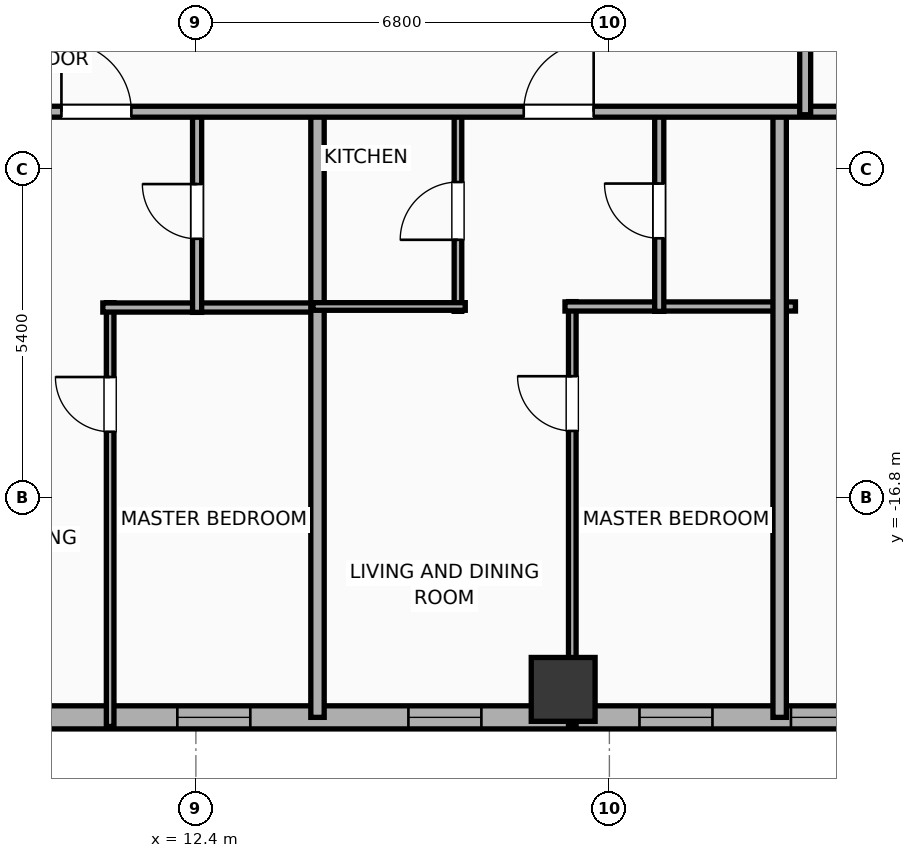
"""IFC4 building model, lengths in metres.
Left out: names, types, materials, properties, quantities, classifications, styles, units other than length and angle.
Written with IfcOpenShell. Run it as: python <this file> out.ifc"""

import sys

from ifc_helpers import new_model, si_unit, direction, frame, frame_2d, origin, origin_2d, place, context, subcontext, project, spatial, rectangle, hollow_rectangle, extrude, element, fill, save


model = new_model("IFC4")
c1 = context("Model", 3, precision=1e-05, world=origin(), true_north=direction((0.0, 1.0)))
c2 = subcontext(c1, "Body", "Model", "MODEL_VIEW")
j1 = project(units=[si_unit("LENGTHUNIT", "METRE"), si_unit("PLANEANGLEUNIT", "RADIAN")], contexts=[c1])
p1 = place(None, origin())
s1 = spatial("IfcSite", under=j1, at=p1, CompositionType="ELEMENT")
p2 = place(p1, origin())
s2 = spatial("IfcBuilding", under=s1, at=p2, CompositionType="ELEMENT")
p3 = place(p2, frame((0.0, 0.0, 93.6)))
s3 = spatial("IfcBuildingStorey", under=s2, at=p3, CompositionType="ELEMENT", Elevation=93.6)
p4 = place(p3, frame((18.44, -19.95, 0.0), z_axis=(0.0, 0.0, 1.0), x_axis=(1.0, 0.0, 0.0)))
e1 = element("IfcColumn", 1, at=p4, inside=s3, PredefinedType="COLUMN", context=c2, shape_type="SweptSolid", body=[
    extrude(hollow_rectangle(XDim=1.05, YDim=1.05, WallThickness=0.036, at=origin_2d()), origin(), (0.0, 0.0, 1.0), 3.9),
])
p5 = place(p3, frame((29.381, -20.41, 0.0), z_axis=(0.0, 0.0, 1.0), x_axis=(-1.0, 0.0, 0.0)))
e2 = element("IfcWall", 2, at=p5, inside=s3, PredefinedType="ELEMENTEDWALL", context=c2, shape_type="SweptSolid", body=[
    extrude(rectangle(XDim=54.763, YDim=0.38, at=frame_2d((27.381, 0.0))), origin(), (0.0, 0.0, 1.0), 3.65),
])
p6 = place(p5, frame((4.795, 0.0, 0.75)))
e3 = element("IfcOpeningElement", 3, at=p6, cuts=e2, PredefinedType="OPENING", context=c2, shape_type="SweptSolid", body=[
    extrude(rectangle(XDim=2.4, YDim=2.1, at=frame_2d((1.2, 1.05))), frame((0.0, 0.2, 0.0), z_axis=(0.0, -1.0, 0.0), x_axis=(1.0, 0.0, 0.0)), (0.0, 0.0, 1.0), 0.4),
])
p7 = place(p5, frame((33.877, 0.0, 0.75)))
e4 = element("IfcOpeningElement", 4, at=p7, cuts=e2, PredefinedType="OPENING", context=c2, shape_type="SweptSolid", body=[
    extrude(rectangle(XDim=2.4, YDim=2.1, at=frame_2d((1.2, 1.05))), frame((0.0, 0.2, 0.0), z_axis=(0.0, -1.0, 0.0), x_axis=(1.0, 0.0, 0.0)), (0.0, 0.0, 1.0), 0.4),
])
p8 = place(p5, frame((45.867, 0.0, 0.75)))
e5 = element("IfcOpeningElement", 5, at=p8, cuts=e2, PredefinedType="OPENING", context=c2, shape_type="SweptSolid", body=[
    extrude(rectangle(XDim=2.4, YDim=2.1, at=frame_2d((1.2, 1.05))), frame((0.0, 0.2, 0.0), z_axis=(0.0, -1.0, 0.0), x_axis=(1.0, 0.0, 0.0)), (0.0, 0.0, 1.0), 0.4),
])
p9 = place(p5, frame((53.122, 0.0, 0.75)))
e6 = element("IfcOpeningElement", 6, at=p9, cuts=e2, PredefinedType="OPENING", context=c2, shape_type="SweptSolid", body=[
    extrude(rectangle(XDim=0.85, YDim=2.05, at=frame_2d((0.425, 1.025))), frame((0.0, 0.2, 0.0), z_axis=(0.0, -1.0, 0.0), x_axis=(1.0, 0.0, 0.0)), (0.0, 0.0, 1.0), 0.4),
])
p10 = place(p5, frame((50.286, 0.0, 0.75)))
e7 = element("IfcOpeningElement", 7, at=p10, cuts=e2, PredefinedType="OPENING", context=c2, shape_type="SweptSolid", body=[
    extrude(rectangle(XDim=1.2, YDim=2.05, at=frame_2d((0.6, 1.025))), frame((0.0, 0.2, 0.0), z_axis=(0.0, -1.0, 0.0), x_axis=(1.0, 0.0, 0.0)), (0.0, 0.0, 1.0), 0.4),
])
p11 = place(p5, frame((41.846, 0.0, 0.75)))
e8 = element("IfcOpeningElement", 8, at=p11, cuts=e2, PredefinedType="OPENING", context=c2, shape_type="SweptSolid", body=[
    extrude(rectangle(XDim=1.2, YDim=2.05, at=frame_2d((0.6, 1.025))), frame((0.0, 0.2, 0.0), z_axis=(0.0, -1.0, 0.0), x_axis=(1.0, 0.0, 0.0)), (0.0, 0.0, 1.0), 0.4),
])
p12 = place(p5, frame((38.886, 0.0, 0.75)))
e9 = element("IfcOpeningElement", 9, at=p12, cuts=e2, PredefinedType="OPENING", context=c2, shape_type="SweptSolid", body=[
    extrude(rectangle(XDim=1.2, YDim=2.05, at=frame_2d((0.6, 1.025))), frame((0.0, 0.2, 0.0), z_axis=(0.0, -1.0, 0.0), x_axis=(1.0, 0.0, 0.0)), (0.0, 0.0, 1.0), 0.4),
])
p13 = place(p5, frame((30.926, 0.0, 0.75)))
e10 = element("IfcOpeningElement", 10, at=p13, cuts=e2, PredefinedType="OPENING", context=c2, shape_type="SweptSolid", body=[
    extrude(rectangle(XDim=1.2, YDim=2.05, at=frame_2d((0.6, 1.025))), frame((0.0, 0.2, 0.0), z_axis=(0.0, -1.0, 0.0), x_axis=(1.0, 0.0, 0.0)), (0.0, 0.0, 1.0), 0.4),
])
p14 = place(p5, frame((27.486, 0.0, 0.75)))
e11 = element("IfcOpeningElement", 11, at=p14, cuts=e2, PredefinedType="OPENING", context=c2, shape_type="SweptSolid", body=[
    extrude(rectangle(XDim=1.2, YDim=2.05, at=frame_2d((0.6, 1.025))), frame((0.0, 0.2, 0.0), z_axis=(0.0, -1.0, 0.0), x_axis=(1.0, 0.0, 0.0)), (0.0, 0.0, 1.0), 0.4),
])
p15 = place(p5, frame((23.686, 0.0, 0.75)))
e12 = element("IfcOpeningElement", 12, at=p15, cuts=e2, PredefinedType="OPENING", context=c2, shape_type="SweptSolid", body=[
    extrude(rectangle(XDim=1.2, YDim=2.05, at=frame_2d((0.6, 1.025))), frame((0.0, 0.2, 0.0), z_axis=(0.0, -1.0, 0.0), x_axis=(1.0, 0.0, 0.0)), (0.0, 0.0, 1.0), 0.4),
])
p16 = place(p5, frame((19.886, 0.0, 0.75)))
e13 = element("IfcOpeningElement", 13, at=p16, cuts=e2, PredefinedType="OPENING", context=c2, shape_type="SweptSolid", body=[
    extrude(rectangle(XDim=1.2, YDim=2.05, at=frame_2d((0.6, 1.025))), frame((0.0, 0.2, 0.0), z_axis=(0.0, -1.0, 0.0), x_axis=(1.0, 0.0, 0.0)), (0.0, 0.0, 1.0), 0.4),
])
p17 = place(p5, frame((16.086, 0.0, 0.75)))
e14 = element("IfcOpeningElement", 14, at=p17, cuts=e2, PredefinedType="OPENING", context=c2, shape_type="SweptSolid", body=[
    extrude(rectangle(XDim=1.2, YDim=2.05, at=frame_2d((0.6, 1.025))), frame((0.0, 0.2, 0.0), z_axis=(0.0, -1.0, 0.0), x_axis=(1.0, 0.0, 0.0)), (0.0, 0.0, 1.0), 0.4),
])
p18 = place(p5, frame((12.286, 0.0, 0.75)))
e15 = element("IfcOpeningElement", 15, at=p18, cuts=e2, PredefinedType="OPENING", context=c2, shape_type="SweptSolid", body=[
    extrude(rectangle(XDim=1.2, YDim=2.05, at=frame_2d((0.6, 1.025))), frame((0.0, 0.2, 0.0), z_axis=(0.0, -1.0, 0.0), x_axis=(1.0, 0.0, 0.0)), (0.0, 0.0, 1.0), 0.4),
])
p19 = place(p5, frame((8.486, 0.0, 0.75)))
e16 = element("IfcOpeningElement", 16, at=p19, cuts=e2, PredefinedType="OPENING", context=c2, shape_type="SweptSolid", body=[
    extrude(rectangle(XDim=1.2, YDim=2.05, at=frame_2d((0.6, 1.025))), frame((0.0, 0.2, 0.0), z_axis=(0.0, -1.0, 0.0), x_axis=(1.0, 0.0, 0.0)), (0.0, 0.0, 1.0), 0.4),
])
p20 = place(p5, frame((2.277, 0.0, 0.75)))
e17 = element("IfcOpeningElement", 17, at=p20, cuts=e2, PredefinedType="OPENING", context=c2, shape_type="SweptSolid", body=[
    extrude(rectangle(XDim=1.2, YDim=2.05, at=frame_2d((0.6, 1.025))), frame((0.0, 0.2, 0.0), z_axis=(0.0, -1.0, 0.0), x_axis=(1.0, 0.0, 0.0)), (0.0, 0.0, 1.0), 0.4),
])
p21 = place(p5, frame((1.071, 0.0, 0.75)))
e18 = element("IfcOpeningElement", 18, at=p21, cuts=e2, PredefinedType="OPENING", context=c2, shape_type="SweptSolid", body=[
    extrude(rectangle(XDim=0.52, YDim=2.05, at=frame_2d((0.26, 1.025))), frame((0.0, 0.2, 0.0), z_axis=(0.0, -1.0, 0.0), x_axis=(1.0, 0.0, 0.0)), (0.0, 0.0, 1.0), 0.4),
])
p22 = place(p3, frame((10.99, -20.56, 0.0), z_axis=(0.0, 0.0, 1.0), x_axis=(0.0, 1.0, 0.0)))
e19 = element("IfcWall", 19, at=p22, inside=s3, PredefinedType="PARTITIONING", context=c2, shape_type="SweptSolid", body=[
    extrude(rectangle(XDim=6.97, YDim=0.125, at=frame_2d((3.485, 0.0))), origin(), (0.0, 0.0, 1.0), 3.65),
])
p23 = place(p22, frame((4.847, 0.0, 0.0)))
e20 = element("IfcOpeningElement", 20, at=p23, cuts=e19, PredefinedType="OPENING", context=c2, shape_type="SweptSolid", body=[
    extrude(rectangle(XDim=0.9, YDim=2.05, at=frame_2d((0.45, 1.025))), frame((0.0, 0.073, 0.0), z_axis=(0.0, -1.0, 0.0), x_axis=(1.0, 0.0, 0.0)), (0.0, 0.0, 1.0), 0.145),
])
p24 = place(p3, frame((10.87, -13.67, 0.0), z_axis=(0.0, 0.0, 1.0), x_axis=(1.0, 0.0, 0.0)))
e21 = element("IfcWall", 21, at=p24, inside=s3, PredefinedType="PLUMBINGWALL", context=c2, shape_type="SweptSolid", body=[
    extrude(rectangle(XDim=3.605, YDim=0.15, at=frame_2d((1.802, 0.0))), origin(), (0.0, 0.0, 1.0), 3.65),
])
p25 = place(p3, frame((12.42, -13.75, 0.0), z_axis=(0.0, 0.0, 1.0), x_axis=(0.0, 1.0, 0.0)))
e22 = element("IfcWall", 22, at=p25, inside=s3, PredefinedType="PLUMBINGWALL", context=c2, shape_type="SweptSolid", body=[
    extrude(rectangle(XDim=3.32, YDim=0.15, at=frame_2d((1.66, 0.0))), origin(), (0.0, 0.0, 1.0), 3.65),
])
p26 = place(p25, frame((1.21, 0.0, 0.0)))
e23 = element("IfcOpeningElement", 23, at=p26, cuts=e22, PredefinedType="OPENING", context=c2, shape_type="SweptSolid", body=[
    extrude(rectangle(XDim=0.9, YDim=2.05, at=frame_2d((0.45, 1.025))), frame((0.0, 0.085, 0.0), z_axis=(0.0, -1.0, 0.0), x_axis=(1.0, 0.0, 0.0)), (0.0, 0.0, 1.0), 0.17),
])
p27 = place(p3, frame((14.4, -20.41, 0.0), z_axis=(0.0, 0.0, 1.0), x_axis=(0.0, 1.0, 0.0)))
e24 = element("IfcWall", 24, at=p27, inside=s3, PredefinedType="PARTITIONING", context=c2, shape_type="SweptSolid", body=[
    extrude(rectangle(XDim=10.04, YDim=0.22, at=frame_2d((5.02, 0.0))), origin(), (0.0, 0.0, 1.0), 3.65),
])
p28 = place(p3, frame((18.59, -20.56, 0.0), z_axis=(0.0, 0.0, 1.0), x_axis=(0.0, 1.0, 0.0)))
e25 = element("IfcWall", 25, at=p28, inside=s3, PredefinedType="PARTITIONING", context=c2, shape_type="SweptSolid", body=[
    extrude(rectangle(XDim=6.987, YDim=0.125, at=frame_2d((3.494, 0.0))), origin(), (0.0, 0.0, 1.0), 3.04),
])
p29 = place(p28, frame((4.86, 0.0, 0.0)))
e26 = element("IfcOpeningElement", 26, at=p29, cuts=e25, PredefinedType="OPENING", context=c2, shape_type="SweptSolid", body=[
    extrude(rectangle(XDim=0.9, YDim=2.05, at=frame_2d((0.45, 1.025))), frame((0.0, 0.073, 0.0), z_axis=(0.0, -1.0, 0.0), x_axis=(1.0, 0.0, 0.0)), (0.0, 0.0, 1.0), 0.145),
])
p30 = place(p3, frame((18.47, -13.653, 0.0), z_axis=(0.0, 0.0, 1.0), x_axis=(1.0, 0.0, 0.0)))
e27 = element("IfcWall", 27, at=p30, inside=s3, PredefinedType="PLUMBINGWALL", context=c2, shape_type="SweptSolid", body=[
    extrude(rectangle(XDim=3.79, YDim=0.15, at=frame_2d((1.895, 0.0))), origin(), (0.0, 0.0, 1.0), 3.65),
])
p31 = place(p3, frame((16.71, -13.733, 0.0), z_axis=(0.0, 0.0, 1.0), x_axis=(0.0, 1.0, 0.0)))
e28 = element("IfcWall", 28, at=p31, inside=s3, PredefinedType="PARTITIONING", context=c2, shape_type="SweptSolid", body=[
    extrude(rectangle(XDim=3.303, YDim=0.125, at=frame_2d((1.651, 0.0))), origin(), (0.0, 0.0, 1.0), 3.65),
])
p32 = place(p31, frame((1.177, 0.0, 0.0)))
e29 = element("IfcOpeningElement", 29, at=p32, cuts=e28, PredefinedType="OPENING", context=c2, shape_type="SweptSolid", body=[
    extrude(rectangle(XDim=0.95, YDim=2.05, at=frame_2d((0.475, 1.025))), frame((0.0, 0.073, 0.0), z_axis=(0.0, -1.0, 0.0), x_axis=(1.0, 0.0, 0.0)), (0.0, 0.0, 1.0), 0.145),
])
p33 = place(p3, frame((14.325, -13.653, 0.0), z_axis=(0.0, 0.0, 1.0), x_axis=(1.0, 0.0, 0.0)))
e30 = element("IfcWall", 30, at=p33, inside=s3, PredefinedType="PARTITIONING", context=c2, shape_type="SweptSolid", body=[
    extrude(rectangle(XDim=2.505, YDim=0.125, at=frame_2d((1.252, 0.0))), origin(), (0.0, 0.0, 1.0), 3.65),
])
p34 = place(p3, frame((20.02, -13.733, 0.0), z_axis=(0.0, 0.0, 1.0), x_axis=(0.0, 1.0, 0.0)))
e31 = element("IfcWall", 31, at=p34, inside=s3, PredefinedType="PLUMBINGWALL", context=c2, shape_type="SweptSolid", body=[
    extrude(rectangle(XDim=3.303, YDim=0.15, at=frame_2d((1.651, 0.0))), origin(), (0.0, 0.0, 1.0), 3.65),
])
p35 = place(p34, frame((1.201, 0.0, 0.0)))
e32 = element("IfcOpeningElement", 32, at=p35, cuts=e31, PredefinedType="OPENING", context=c2, shape_type="SweptSolid", body=[
    extrude(rectangle(XDim=0.9, YDim=2.05, at=frame_2d((0.45, 1.025))), frame((0.0, 0.085, 0.0), z_axis=(0.0, -1.0, 0.0), x_axis=(1.0, 0.0, 0.0)), (0.0, 0.0, 1.0), 0.17),
])
p36 = place(p3, frame((22.0, -20.41, 0.0), z_axis=(0.0, 0.0, 1.0), x_axis=(0.0, 1.0, 0.0)))
e33 = element("IfcWall", 33, at=p36, inside=s3, PredefinedType="PARTITIONING", context=c2, shape_type="SweptSolid", body=[
    extrude(rectangle(XDim=10.04, YDim=0.22, at=frame_2d((5.02, 0.0))), origin(), (0.0, 0.0, 1.0), 3.65),
])
p37 = place(p3, frame((-29.21, -10.45, 0.0), z_axis=(0.0, 0.0, 1.0), x_axis=(1.0, 0.0, 0.0)))
e34 = element("IfcWall", 34, at=p37, inside=s3, PredefinedType="PARTITIONING", context=c2, shape_type="SweptSolid", body=[
    extrude(rectangle(XDim=62.42, YDim=0.18, at=frame_2d((31.21, 0.0))), origin(), (0.0, 0.0, 1.0), 3.65),
])
p38 = place(p37, frame((2.502, 0.0, 0.0)))
e35 = element("IfcOpeningElement", 35, at=p38, cuts=e34, PredefinedType="OPENING", context=c2, shape_type="SweptSolid", body=[
    extrude(rectangle(XDim=0.9, YDim=2.05, at=frame_2d((0.45, 1.025))), frame((0.0, 0.1, 0.0), z_axis=(0.0, -1.0, 0.0), x_axis=(1.0, 0.0, 0.0)), (0.0, 0.0, 1.0), 0.2),
])
p39 = place(p37, frame((9.0, 0.0, 0.0)))
e36 = element("IfcOpeningElement", 36, at=p39, cuts=e34, PredefinedType="OPENING", context=c2, shape_type="SweptSolid", body=[
    extrude(rectangle(XDim=1.15, YDim=2.05, at=frame_2d((0.575, 1.025))), frame((0.0, 0.1, 0.0), z_axis=(0.0, -1.0, 0.0), x_axis=(1.0, 0.0, 0.0)), (0.0, 0.0, 1.0), 0.2),
])
p40 = place(p37, frame((16.603, 0.0, 0.0)))
e37 = element("IfcOpeningElement", 37, at=p40, cuts=e34, PredefinedType="OPENING", context=c2, shape_type="SweptSolid", body=[
    extrude(rectangle(XDim=1.15, YDim=2.05, at=frame_2d((0.575, 1.025))), frame((0.0, 0.1, 0.0), z_axis=(0.0, -1.0, 0.0), x_axis=(1.0, 0.0, 0.0)), (0.0, 0.0, 1.0), 0.2),
])
p41 = place(p37, frame((24.199, 0.0, 0.0)))
e38 = element("IfcOpeningElement", 38, at=p41, cuts=e34, PredefinedType="OPENING", context=c2, shape_type="SweptSolid", body=[
    extrude(rectangle(XDim=1.15, YDim=2.05, at=frame_2d((0.575, 1.025))), frame((0.0, 0.1, 0.0), z_axis=(0.0, -1.0, 0.0), x_axis=(1.0, 0.0, 0.0)), (0.0, 0.0, 1.0), 0.2),
])
p42 = place(p37, frame((31.802, 0.0, 0.0)))
e39 = element("IfcOpeningElement", 39, at=p42, cuts=e34, PredefinedType="OPENING", context=c2, shape_type="SweptSolid", body=[
    extrude(rectangle(XDim=1.15, YDim=2.05, at=frame_2d((0.575, 1.025))), frame((0.0, 0.1, 0.0), z_axis=(0.0, -1.0, 0.0), x_axis=(1.0, 0.0, 0.0)), (0.0, 0.0, 1.0), 0.2),
])
p43 = place(p37, frame((39.399, 0.0, 0.0)))
e40 = element("IfcOpeningElement", 40, at=p43, cuts=e34, PredefinedType="OPENING", context=c2, shape_type="SweptSolid", body=[
    extrude(rectangle(XDim=1.15, YDim=2.05, at=frame_2d((0.575, 1.025))), frame((0.0, 0.1, 0.0), z_axis=(0.0, -1.0, 0.0), x_axis=(1.0, 0.0, 0.0)), (0.0, 0.0, 1.0), 0.2),
])
p44 = place(p37, frame((47.001, 0.0, 0.0)))
e41 = element("IfcOpeningElement", 41, at=p44, cuts=e34, PredefinedType="OPENING", context=c2, shape_type="SweptSolid", body=[
    extrude(rectangle(XDim=1.15, YDim=2.05, at=frame_2d((0.575, 1.025))), frame((0.0, 0.1, 0.0), z_axis=(0.0, -1.0, 0.0), x_axis=(1.0, 0.0, 0.0)), (0.0, 0.0, 1.0), 0.2),
])
p45 = place(p37, frame((52.363, 0.0, 0.0)))
e42 = element("IfcOpeningElement", 42, at=p45, cuts=e34, PredefinedType="OPENING", context=c2, shape_type="SweptSolid", body=[
    extrude(rectangle(XDim=1.15, YDim=2.05, at=frame_2d((0.575, 1.025))), frame((0.0, 0.1, 0.0), z_axis=(0.0, -1.0, 0.0), x_axis=(1.0, 0.0, 0.0)), (0.0, 0.0, 1.0), 0.2),
])
p46 = place(p37, frame((59.386, 0.0, 0.0)))
e43 = element("IfcOpeningElement", 43, at=p46, cuts=e34, PredefinedType="OPENING", context=c2, shape_type="SweptSolid", body=[
    extrude(rectangle(XDim=0.9, YDim=2.05, at=frame_2d((0.45, 1.025))), frame((0.0, 0.1, 0.0), z_axis=(0.0, -1.0, 0.0), x_axis=(1.0, 0.0, 0.0)), (0.0, 0.0, 1.0), 0.2),
])
p47 = place(p3, frame((22.42, -10.5, 0.0), z_axis=(0.0, 0.0, 1.0), x_axis=(0.0, 1.0, 0.0)))
e44 = element("IfcWall", 44, at=p47, inside=s3, PredefinedType="PARTITIONING", context=c2, shape_type="SweptSolid", body=[
    extrude(rectangle(XDim=21.0, YDim=0.18, at=frame_2d((10.5, 0.0))), origin(), (0.0, 0.0, 1.0), 3.65),
])
p48 = place(p47, frame((18.205, 0.0, 0.0)))
e45 = element("IfcOpeningElement", 45, at=p48, cuts=e44, PredefinedType="OPENING", context=c2, shape_type="SweptSolid", body=[
    extrude(rectangle(XDim=0.95, YDim=2.05, at=frame_2d((0.475, 1.025))), frame((0.0, 0.1, 0.0), z_axis=(0.0, -1.0, 0.0), x_axis=(1.0, 0.0, 0.0)), (0.0, 0.0, 1.0), 0.2),
])
p49 = place(p6, origin())
e46 = element("IfcWindow", 46, at=p49, inside=s3, PartitioningType="SINGLE_PANEL", PredefinedType="WINDOW", context=c2, shape_type="SweptSolid", body=[
    extrude(rectangle(XDim=2.4, YDim=2.1, at=frame_2d((1.2, 1.05))), frame((0.0, 0.03, 0.0), z_axis=(0.0, -1.0, 0.0), x_axis=(1.0, 0.0, 0.0)), (0.0, 0.0, 1.0), 0.06),
])
fill(e3, e46)
p50 = place(p17, origin())
e47 = element("IfcWindow", 47, at=p50, inside=s3, PartitioningType="SINGLE_PANEL", PredefinedType="WINDOW", context=c2, shape_type="SweptSolid", body=[
    extrude(rectangle(XDim=1.2, YDim=2.05, at=frame_2d((0.6, 1.025))), frame((0.0, 0.03, 0.0), z_axis=(0.0, -1.0, 0.0), x_axis=(1.0, 0.0, 0.0)), (0.0, 0.0, 1.0), 0.06),
])
fill(e14, e47)
p51 = place(p18, origin())
e48 = element("IfcWindow", 48, at=p51, inside=s3, PartitioningType="SINGLE_PANEL", PredefinedType="WINDOW", context=c2, shape_type="SweptSolid", body=[
    extrude(rectangle(XDim=1.2, YDim=2.05, at=frame_2d((0.6, 1.025))), frame((0.0, 0.03, 0.0), z_axis=(0.0, -1.0, 0.0), x_axis=(1.0, 0.0, 0.0)), (0.0, 0.0, 1.0), 0.06),
])
fill(e15, e48)
p52 = place(p19, origin())
e49 = element("IfcWindow", 49, at=p52, inside=s3, PartitioningType="SINGLE_PANEL", PredefinedType="WINDOW", context=c2, shape_type="SweptSolid", body=[
    extrude(rectangle(XDim=1.2, YDim=2.05, at=frame_2d((0.6, 1.025))), frame((0.0, 0.03, 0.0), z_axis=(0.0, -1.0, 0.0), x_axis=(1.0, 0.0, 0.0)), (0.0, 0.0, 1.0), 0.06),
])
fill(e16, e49)
p53 = place(p23, origin())
e50 = element("IfcDoor", 50, at=p53, inside=s3, OperationType="SINGLE_SWING_RIGHT", PredefinedType="DOOR", context=c2, shape_type="SweptSolid", body=[
    extrude(rectangle(XDim=0.9, YDim=2.05, at=frame_2d((0.45, 1.025))), frame((0.0, 0.025, 0.0), z_axis=(0.0, -1.0, 0.0), x_axis=(1.0, 0.0, 0.0)), (0.0, 0.0, 1.0), 0.05),
])
fill(e20, e50)
p54 = place(p26, origin())
e51 = element("IfcDoor", 51, at=p54, inside=s3, OperationType="SINGLE_SWING_RIGHT", PredefinedType="DOOR", context=c2, shape_type="SweptSolid", body=[
    extrude(rectangle(XDim=0.9, YDim=2.05, at=frame_2d((0.45, 1.025))), frame((0.0, 0.025, 0.0), z_axis=(0.0, -1.0, 0.0), x_axis=(1.0, 0.0, 0.0)), (0.0, 0.0, 1.0), 0.05),
])
fill(e23, e51)
p55 = place(p29, origin())
e52 = element("IfcDoor", 52, at=p55, inside=s3, OperationType="SINGLE_SWING_RIGHT", PredefinedType="DOOR", context=c2, shape_type="SweptSolid", body=[
    extrude(rectangle(XDim=0.9, YDim=2.05, at=frame_2d((0.45, 1.025))), frame((0.0, 0.025, 0.0), z_axis=(0.0, -1.0, 0.0), x_axis=(1.0, 0.0, 0.0)), (0.0, 0.0, 1.0), 0.05),
])
fill(e26, e52)
p56 = place(p32, origin())
e53 = element("IfcDoor", 53, at=p56, inside=s3, OperationType="SINGLE_SWING_LEFT", PredefinedType="DOOR", context=c2, shape_type="SweptSolid", body=[
    extrude(rectangle(XDim=0.95, YDim=2.05, at=frame_2d((0.475, 1.025))), frame((0.0, 0.025, 0.0), z_axis=(0.0, -1.0, 0.0), x_axis=(1.0, 0.0, 0.0)), (0.0, 0.0, 1.0), 0.05),
])
fill(e29, e53)
p57 = place(p35, origin())
e54 = element("IfcDoor", 54, at=p57, inside=s3, OperationType="SINGLE_SWING_RIGHT", PredefinedType="DOOR", context=c2, shape_type="SweptSolid", body=[
    extrude(rectangle(XDim=0.9, YDim=2.05, at=frame_2d((0.45, 1.025))), frame((0.0, 0.025, 0.0), z_axis=(0.0, -1.0, 0.0), x_axis=(1.0, 0.0, 0.0)), (0.0, 0.0, 1.0), 0.05),
])
fill(e32, e54)
p58 = place(p43, origin())
e55 = element("IfcDoor", 55, at=p58, inside=s3, OperationType="SINGLE_SWING_LEFT", PredefinedType="DOOR", context=c2, shape_type="SweptSolid", body=[
    extrude(rectangle(XDim=1.15, YDim=2.05, at=frame_2d((0.575, 1.025))), frame((0.0, 0.025, 0.0), z_axis=(0.0, -1.0, 0.0), x_axis=(1.0, 0.0, 0.0)), (0.0, 0.0, 1.0), 0.05),
])
fill(e40, e55)
p59 = place(p44, origin())
e56 = element("IfcDoor", 56, at=p59, inside=s3, OperationType="SINGLE_SWING_RIGHT", PredefinedType="DOOR", context=c2, shape_type="SweptSolid", body=[
    extrude(rectangle(XDim=1.15, YDim=2.05, at=frame_2d((0.575, 1.025))), frame((0.0, 0.025, 0.0), z_axis=(0.0, -1.0, 0.0), x_axis=(1.0, 0.0, 0.0)), (0.0, 0.0, 1.0), 0.05),
])
fill(e41, e56)
save(model, sys.argv[1])
